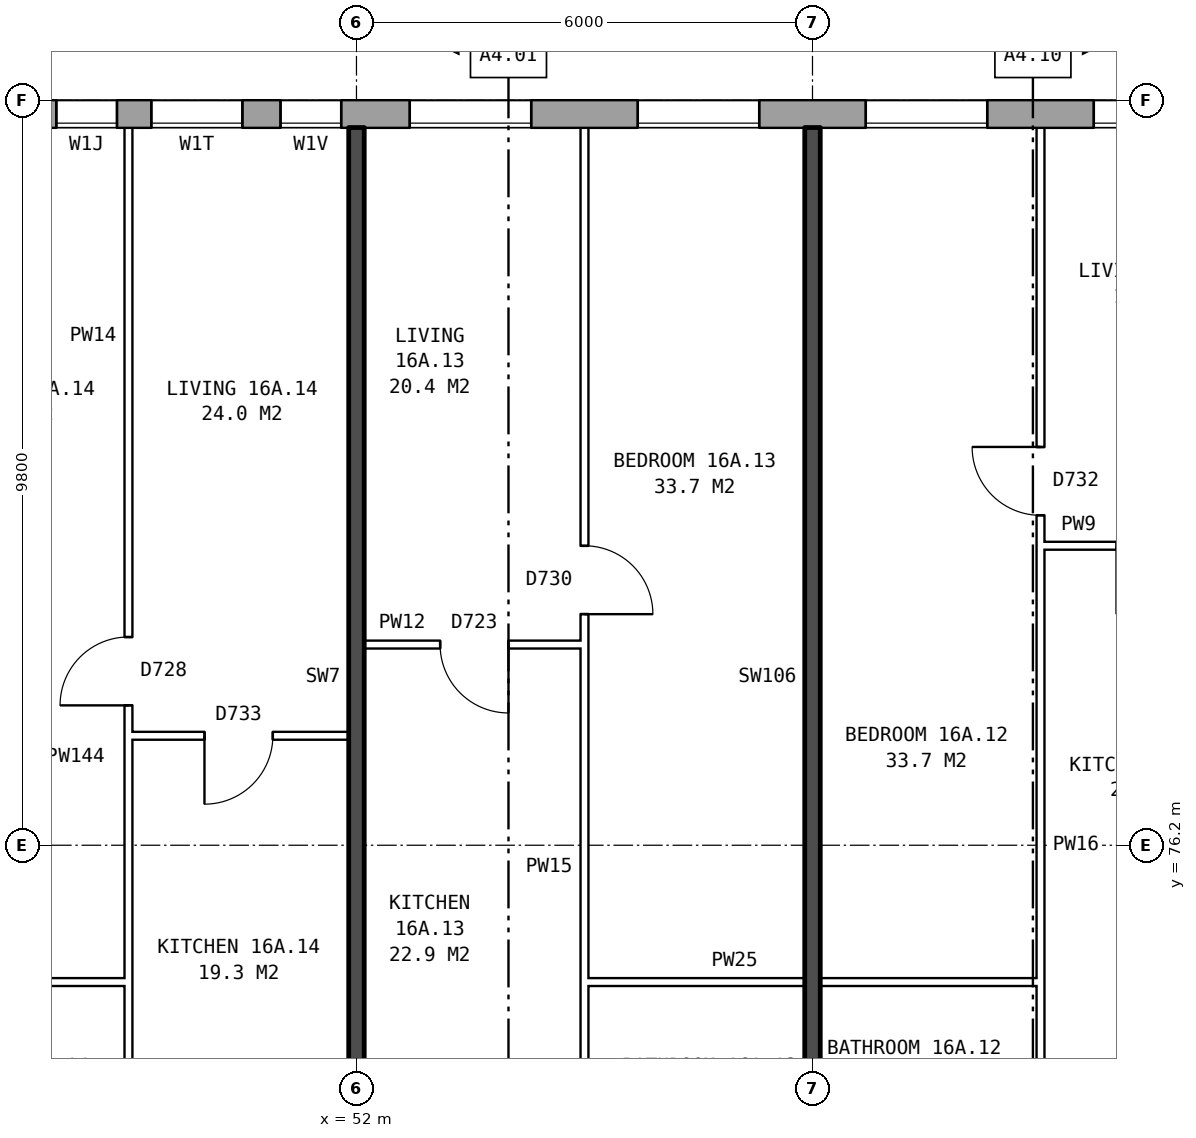
"""IFC4 building model, lengths in metres.
Left out: names, types, materials, properties, quantities, classifications, styles, units other than length and angle.
Written with IfcOpenShell. Run it as: python <this file> out.ifc"""

import sys

from ifc_helpers import new_model, si_unit, direction, frame, frame_2d, origin, place, context, subcontext, project, spatial, rectangle, extrude, element, fill, save


model = new_model("IFC4")
c1 = context("Model", 3, precision=1e-05, world=origin(), true_north=direction((0.0, 1.0)))
c2 = subcontext(c1, "Body", "Model", "MODEL_VIEW")
j1 = project(units=[si_unit("LENGTHUNIT", "METRE"), si_unit("PLANEANGLEUNIT", "RADIAN")], contexts=[c1])
p1 = place(None, origin())
s1 = spatial("IfcSite", under=j1, at=p1, CompositionType="ELEMENT")
p2 = place(p1, origin())
s2 = spatial("IfcBuilding", under=s1, at=p2, CompositionType="ELEMENT")
p3 = place(p2, frame((0.0, 0.0, 59.8)))
s3 = spatial("IfcBuildingStorey", under=s2, at=p3, CompositionType="ELEMENT", Elevation=59.8)
p4 = place(p3, frame((72.925, 85.82, 0.0), z_axis=(0.0, 0.0, 1.0), x_axis=(-1.0, 0.0, 0.0)))
e1 = element("IfcWall", 1, at=p4, inside=s3, PredefinedType="STANDARD", context=c2, shape_type="SweptSolid", body=[
    extrude(rectangle(XDim=48.351, YDim=0.36, at=frame_2d((24.175, 0.0))), origin(), (0.0, 0.0, 1.0), 2.85),
])
p5 = place(p4, frame((0.625, 0.0, 0.8)))
e2 = element("IfcOpeningElement", 2, at=p5, cuts=e1, PredefinedType="OPENING", context=c2, shape_type="SweptSolid", body=[
    extrude(rectangle(XDim=1.6, YDim=1.8, at=frame_2d((0.8, 0.9))), frame((0.0, 0.19, 0.0), z_axis=(0.0, -1.0, 0.0), x_axis=(1.0, 0.0, 0.0)), (0.0, 0.0, 1.0), 0.38),
])
p6 = place(p4, frame((3.625, 0.0, 0.8)))
e3 = element("IfcOpeningElement", 3, at=p6, cuts=e1, PredefinedType="OPENING", context=c2, shape_type="SweptSolid", body=[
    extrude(rectangle(XDim=1.6, YDim=1.8, at=frame_2d((0.8, 0.9))), frame((0.0, 0.19, 0.0), z_axis=(0.0, -1.0, 0.0), x_axis=(1.0, 0.0, 0.0)), (0.0, 0.0, 1.0), 0.38),
])
p7 = place(p4, frame((6.625, 0.0, 0.8)))
e4 = element("IfcOpeningElement", 4, at=p7, cuts=e1, PredefinedType="OPENING", context=c2, shape_type="SweptSolid", body=[
    extrude(rectangle(XDim=1.6, YDim=1.8, at=frame_2d((0.8, 0.9))), frame((0.0, 0.19, 0.0), z_axis=(0.0, -1.0, 0.0), x_axis=(1.0, 0.0, 0.0)), (0.0, 0.0, 1.0), 0.38),
])
p8 = place(p4, frame((9.625, 0.0, 0.8)))
e5 = element("IfcOpeningElement", 5, at=p8, cuts=e1, PredefinedType="OPENING", context=c2, shape_type="SweptSolid", body=[
    extrude(rectangle(XDim=1.6, YDim=1.8, at=frame_2d((0.8, 0.9))), frame((0.0, 0.19, 0.0), z_axis=(0.0, -1.0, 0.0), x_axis=(1.0, 0.0, 0.0)), (0.0, 0.0, 1.0), 0.38),
])
p9 = place(p4, frame((12.625, 0.0, 0.8)))
e6 = element("IfcOpeningElement", 6, at=p9, cuts=e1, PredefinedType="OPENING", context=c2, shape_type="SweptSolid", body=[
    extrude(rectangle(XDim=1.6, YDim=1.8, at=frame_2d((0.8, 0.9))), frame((0.0, 0.19, 0.0), z_axis=(0.0, -1.0, 0.0), x_axis=(1.0, 0.0, 0.0)), (0.0, 0.0, 1.0), 0.38),
])
p10 = place(p4, frame((15.625, 0.0, 0.8)))
e7 = element("IfcOpeningElement", 7, at=p10, cuts=e1, PredefinedType="OPENING", context=c2, shape_type="SweptSolid", body=[
    extrude(rectangle(XDim=1.6, YDim=1.8, at=frame_2d((0.8, 0.9))), frame((0.0, 0.19, 0.0), z_axis=(0.0, -1.0, 0.0), x_axis=(1.0, 0.0, 0.0)), (0.0, 0.0, 1.0), 0.38),
])
p11 = place(p4, frame((18.625, 0.0, 0.8)))
e8 = element("IfcOpeningElement", 8, at=p11, cuts=e1, PredefinedType="OPENING", context=c2, shape_type="SweptSolid", body=[
    extrude(rectangle(XDim=1.6, YDim=1.8, at=frame_2d((0.8, 0.9))), frame((0.0, 0.19, 0.0), z_axis=(0.0, -1.0, 0.0), x_axis=(1.0, 0.0, 0.0)), (0.0, 0.0, 1.0), 0.38),
])
p12 = place(p4, frame((21.125, 0.0, 1.65)))
e9 = element("IfcOpeningElement", 9, at=p12, cuts=e1, PredefinedType="OPENING", context=c2, shape_type="SweptSolid", body=[
    extrude(rectangle(XDim=0.8, YDim=0.9, at=frame_2d((0.4, 0.45))), frame((0.0, 0.19, 0.0), z_axis=(0.0, -1.0, 0.0), x_axis=(1.0, 0.0, 0.0)), (0.0, 0.0, 1.0), 0.38),
])
p13 = place(p4, frame((24.075, 0.0, 0.25)))
e10 = element("IfcOpeningElement", 10, at=p13, cuts=e1, PredefinedType="OPENING", context=c2, shape_type="SweptSolid", body=[
    extrude(rectangle(XDim=0.8, YDim=1.5, at=frame_2d((0.4, 0.75))), frame((0.0, 0.19, 0.0), z_axis=(0.0, -1.0, 0.0), x_axis=(1.0, 0.0, 0.0)), (0.0, 0.0, 1.0), 0.38),
])
p14 = place(p4, frame((27.625, 0.0, 0.8)))
e11 = element("IfcOpeningElement", 11, at=p14, cuts=e1, PredefinedType="OPENING", context=c2, shape_type="SweptSolid", body=[
    extrude(rectangle(XDim=1.6, YDim=1.8, at=frame_2d((0.8, 0.9))), frame((0.0, 0.19, 0.0), z_axis=(0.0, -1.0, 0.0), x_axis=(1.0, 0.0, 0.0)), (0.0, 0.0, 1.0), 0.38),
])
p15 = place(p4, frame((30.625, 0.0, 0.8)))
e12 = element("IfcOpeningElement", 12, at=p15, cuts=e1, PredefinedType="OPENING", context=c2, shape_type="SweptSolid", body=[
    extrude(rectangle(XDim=1.6, YDim=1.8, at=frame_2d((0.8, 0.9))), frame((0.0, 0.19, 0.0), z_axis=(0.0, -1.0, 0.0), x_axis=(1.0, 0.0, 0.0)), (0.0, 0.0, 1.0), 0.38),
])
p16 = place(p4, frame((33.625, 0.0, 0.8)))
e13 = element("IfcOpeningElement", 13, at=p16, cuts=e1, PredefinedType="OPENING", context=c2, shape_type="SweptSolid", body=[
    extrude(rectangle(XDim=1.6, YDim=1.8, at=frame_2d((0.8, 0.9))), frame((0.0, 0.19, 0.0), z_axis=(0.0, -1.0, 0.0), x_axis=(1.0, 0.0, 0.0)), (0.0, 0.0, 1.0), 0.38),
])
p17 = place(p4, frame((36.625, 0.0, 0.8)))
e14 = element("IfcOpeningElement", 14, at=p17, cuts=e1, PredefinedType="OPENING", context=c2, shape_type="SweptSolid", body=[
    extrude(rectangle(XDim=1.6, YDim=1.8, at=frame_2d((0.8, 0.9))), frame((0.0, 0.19, 0.0), z_axis=(0.0, -1.0, 0.0), x_axis=(1.0, 0.0, 0.0)), (0.0, 0.0, 1.0), 0.38),
])
p18 = place(p4, frame((39.625, 0.0, 0.8)))
e15 = element("IfcOpeningElement", 15, at=p18, cuts=e1, PredefinedType="OPENING", context=c2, shape_type="SweptSolid", body=[
    extrude(rectangle(XDim=1.6, YDim=1.8, at=frame_2d((0.8, 0.9))), frame((0.0, 0.19, 0.0), z_axis=(0.0, -1.0, 0.0), x_axis=(1.0, 0.0, 0.0)), (0.0, 0.0, 1.0), 0.38),
])
p19 = place(p4, frame((42.625, 0.0, 0.8)))
e16 = element("IfcOpeningElement", 16, at=p19, cuts=e1, PredefinedType="OPENING", context=c2, shape_type="SweptSolid", body=[
    extrude(rectangle(XDim=1.6, YDim=1.8, at=frame_2d((0.8, 0.9))), frame((0.0, 0.19, 0.0), z_axis=(0.0, -1.0, 0.0), x_axis=(1.0, 0.0, 0.0)), (0.0, 0.0, 1.0), 0.38),
])
p20 = place(p4, frame((45.625, 0.0, 0.8)))
e17 = element("IfcOpeningElement", 17, at=p20, cuts=e1, PredefinedType="OPENING", context=c2, shape_type="SweptSolid", body=[
    extrude(rectangle(XDim=1.6, YDim=1.8, at=frame_2d((0.8, 0.9))), frame((0.0, 0.19, 0.0), z_axis=(0.0, -1.0, 0.0), x_axis=(1.0, 0.0, 0.0)), (0.0, 0.0, 1.0), 0.38),
])
p21 = place(p4, frame((22.425, 0.0, 0.15)))
e18 = element("IfcOpeningElement", 18, at=p21, cuts=e1, PredefinedType="OPENING", context=c2, shape_type="SweptSolid", body=[
    extrude(rectangle(XDim=1.2, YDim=0.9, at=frame_2d((0.6, 0.45))), frame((0.0, 0.19, 0.0), z_axis=(0.0, -1.0, 0.0), x_axis=(1.0, 0.0, 0.0)), (0.0, 0.0, 1.0), 0.38),
])
p22 = place(p4, frame((25.175, 0.0, 0.25)))
e19 = element("IfcOpeningElement", 19, at=p22, cuts=e1, PredefinedType="OPENING", context=c2, shape_type="SweptSolid", body=[
    extrude(rectangle(XDim=0.6, YDim=0.9, at=frame_2d((0.3, 0.45))), frame((0.0, 0.19, 0.0), z_axis=(0.0, -1.0, 0.0), x_axis=(1.0, 0.0, 0.0)), (0.0, 0.0, 1.0), 0.38),
])
p23 = place(p3, frame((46.1, 74.4, 0.0), z_axis=(0.0, 0.0, 1.0), x_axis=(1.0, 0.0, 0.0)))
e20 = element("IfcWall", 20, at=p23, inside=s3, PredefinedType="PARTITIONING", context=c2, shape_type="SweptSolid", body=[
    extrude(rectangle(XDim=2.9, YDim=0.1, at=frame_2d((1.45, 0.0))), origin(), (0.0, 0.0, 1.0), 2.85),
])
p24 = place(p3, frame((55.0, 74.4, 0.0), z_axis=(0.0, 0.0, 1.0), x_axis=(1.0, 0.0, 0.0)))
e21 = element("IfcWall", 21, at=p24, inside=s3, PredefinedType="PARTITIONING", context=c2, shape_type="SweptSolid", body=[
    extrude(rectangle(XDim=6.0, YDim=0.1, at=frame_2d((3.0, 0.0))), origin(), (0.0, 0.0, 1.0), 2.85),
])
p25 = place(p3, frame((49.0, 77.64, 0.0), z_axis=(0.0, 0.0, 1.0), x_axis=(1.0, 0.0, 0.0)))
e22 = element("IfcWall", 22, at=p25, inside=s3, PredefinedType="PARTITIONING", context=c2, shape_type="SweptSolid", body=[
    extrude(rectangle(XDim=2.9, YDim=0.1, at=frame_2d((1.45, 0.0))), origin(), (0.0, 0.0, 1.0), 2.85),
])
p26 = place(p25, frame((1.0, 0.0, 0.0)))
e23 = element("IfcOpeningElement", 23, at=p26, cuts=e22, PredefinedType="OPENING", context=c2, shape_type="SweptSolid", body=[
    extrude(rectangle(XDim=0.9, YDim=2.1, at=frame_2d((0.45, 1.05))), frame((0.0, 0.06, 0.0), z_axis=(0.0, -1.0, 0.0), x_axis=(1.0, 0.0, 0.0)), (0.0, 0.0, 1.0), 0.12),
])
p27 = place(p3, frame((52.1, 78.84, 0.0), z_axis=(0.0, 0.0, 1.0), x_axis=(1.0, 0.0, 0.0)))
e24 = element("IfcWall", 24, at=p27, inside=s3, PredefinedType="PARTITIONING", context=c2, shape_type="SweptSolid", body=[
    extrude(rectangle(XDim=2.9, YDim=0.1, at=frame_2d((1.45, 0.0))), origin(), (0.0, 0.0, 1.0), 2.85),
])
p28 = place(p27, frame((1.0, 0.0, 0.0)))
e25 = element("IfcOpeningElement", 25, at=p28, cuts=e24, PredefinedType="OPENING", context=c2, shape_type="SweptSolid", body=[
    extrude(rectangle(XDim=0.9, YDim=2.1, at=frame_2d((0.45, 1.05))), frame((0.0, 0.06, 0.0), z_axis=(0.0, -1.0, 0.0), x_axis=(1.0, 0.0, 0.0)), (0.0, 0.0, 1.0), 0.12),
])
p29 = place(p3, frame((61.0, 80.14, 0.0), z_axis=(0.0, 0.0, 1.0), x_axis=(1.0, 0.0, 0.0)))
e26 = element("IfcWall", 26, at=p29, inside=s3, PredefinedType="PARTITIONING", context=c2, shape_type="SweptSolid", body=[
    extrude(rectangle(XDim=2.9, YDim=0.1, at=frame_2d((1.45, 0.0))), origin(), (0.0, 0.0, 1.0), 2.85),
])
p30 = place(p29, frame((1.0, 0.0, 0.0)))
e27 = element("IfcOpeningElement", 27, at=p30, cuts=e26, PredefinedType="OPENING", context=c2, shape_type="SweptSolid", body=[
    extrude(rectangle(XDim=0.9, YDim=2.1, at=frame_2d((0.45, 1.05))), frame((0.0, 0.06, 0.0), z_axis=(0.0, -1.0, 0.0), x_axis=(1.0, 0.0, 0.0)), (0.0, 0.0, 1.0), 0.12),
])
p31 = place(p3, frame((49.0, 71.3, 0.0), z_axis=(0.0, 0.0, 1.0), x_axis=(0.0, 1.0, 0.0)))
e28 = element("IfcWall", 28, at=p31, inside=s3, PredefinedType="PARTITIONING", context=c2, shape_type="SweptSolid", body=[
    extrude(rectangle(XDim=14.34, YDim=0.1, at=frame_2d((7.17, 0.0))), origin(), (0.0, 0.0, 1.0), 2.85),
])
p32 = place(p31, frame((6.74, 0.0, 0.0)))
e29 = element("IfcOpeningElement", 29, at=p32, cuts=e28, PredefinedType="OPENING", context=c2, shape_type="SweptSolid", body=[
    extrude(rectangle(XDim=0.9, YDim=2.1, at=frame_2d((0.45, 1.05))), frame((0.0, 0.06, 0.0), z_axis=(0.0, -1.0, 0.0), x_axis=(1.0, 0.0, 0.0)), (0.0, 0.0, 1.0), 0.12),
])
p33 = place(p31, frame((0.4, 0.0, 0.0)))
e30 = element("IfcOpeningElement", 30, at=p33, cuts=e28, PredefinedType="OPENING", context=c2, shape_type="SweptSolid", body=[
    extrude(rectangle(XDim=0.9, YDim=2.1, at=frame_2d((0.45, 1.05))), frame((0.0, 0.06, 0.0), z_axis=(0.0, -1.0, 0.0), x_axis=(1.0, 0.0, 0.0)), (0.0, 0.0, 1.0), 0.12),
])
p34 = place(p3, frame((52.0, 71.2, 0.0), z_axis=(0.0, 0.0, 1.0), x_axis=(0.0, 1.0, 0.0)))
e31 = element("IfcWall", 31, at=p34, inside=s3, PredefinedType="SOLIDWALL", context=c2, shape_type="SweptSolid", body=[
    extrude(rectangle(XDim=14.44, YDim=0.2, at=frame_2d((7.22, 0.0))), origin(), (0.0, 0.0, 1.0), 2.85),
])
p35 = place(p3, frame((55.0, 71.3, 0.0), z_axis=(0.0, 0.0, 1.0), x_axis=(0.0, 1.0, 0.0)))
e32 = element("IfcWall", 32, at=p35, inside=s3, PredefinedType="PARTITIONING", context=c2, shape_type="SweptSolid", body=[
    extrude(rectangle(XDim=14.34, YDim=0.1, at=frame_2d((7.17, 0.0))), origin(), (0.0, 0.0, 1.0), 2.85),
])
p36 = place(p35, frame((7.94, 0.0, 0.0)))
e33 = element("IfcOpeningElement", 33, at=p36, cuts=e32, PredefinedType="OPENING", context=c2, shape_type="SweptSolid", body=[
    extrude(rectangle(XDim=0.9, YDim=2.1, at=frame_2d((0.45, 1.05))), frame((0.0, 0.06, 0.0), z_axis=(0.0, -1.0, 0.0), x_axis=(1.0, 0.0, 0.0)), (0.0, 0.0, 1.0), 0.12),
])
p37 = place(p35, frame((0.4, 0.0, 0.0)))
e34 = element("IfcOpeningElement", 34, at=p37, cuts=e32, PredefinedType="OPENING", context=c2, shape_type="SweptSolid", body=[
    extrude(rectangle(XDim=0.9, YDim=2.1, at=frame_2d((0.45, 1.05))), frame((0.0, 0.06, 0.0), z_axis=(0.0, -1.0, 0.0), x_axis=(1.0, 0.0, 0.0)), (0.0, 0.0, 1.0), 0.12),
])
p38 = place(p3, frame((58.0, 71.2, 0.0), z_axis=(0.0, 0.0, 1.0), x_axis=(0.0, 1.0, 0.0)))
e35 = element("IfcWall", 35, at=p38, inside=s3, PredefinedType="SOLIDWALL", context=c2, shape_type="SweptSolid", body=[
    extrude(rectangle(XDim=14.44, YDim=0.2, at=frame_2d((7.22, 0.0))), origin(), (0.0, 0.0, 1.0), 2.85),
])
p39 = place(p3, frame((61.0, 71.3, 0.0), z_axis=(0.0, 0.0, 1.0), x_axis=(0.0, 1.0, 0.0)))
e36 = element("IfcWall", 36, at=p39, inside=s3, PredefinedType="PARTITIONING", context=c2, shape_type="SweptSolid", body=[
    extrude(rectangle(XDim=14.34, YDim=0.1, at=frame_2d((7.17, 0.0))), origin(), (0.0, 0.0, 1.0), 2.85),
])
p40 = place(p39, frame((9.24, 0.0, 0.0)))
e37 = element("IfcOpeningElement", 37, at=p40, cuts=e36, PredefinedType="OPENING", context=c2, shape_type="SweptSolid", body=[
    extrude(rectangle(XDim=0.9, YDim=2.1, at=frame_2d((0.45, 1.05))), frame((0.0, 0.06, 0.0), z_axis=(0.0, -1.0, 0.0), x_axis=(1.0, 0.0, 0.0)), (0.0, 0.0, 1.0), 0.12),
])
p41 = place(p39, frame((0.9, 0.0, 0.0)))
e38 = element("IfcOpeningElement", 38, at=p41, cuts=e36, PredefinedType="OPENING", context=c2, shape_type="SweptSolid", body=[
    extrude(rectangle(XDim=0.9, YDim=2.1, at=frame_2d((0.45, 1.05))), frame((0.0, 0.06, 0.0), z_axis=(0.0, -1.0, 0.0), x_axis=(1.0, 0.0, 0.0)), (0.0, 0.0, 1.0), 0.12),
])
p42 = place(p8, origin())
e39 = element("IfcWindow", 39, at=p42, inside=s3, PartitioningType="SINGLE_PANEL", PredefinedType="WINDOW", context=c2, shape_type="SweptSolid", body=[
    extrude(rectangle(XDim=1.6, YDim=1.8, at=frame_2d((0.8, 0.9))), frame((0.0, 0.15, 0.0), z_axis=(0.0, -1.0, 0.0), x_axis=(1.0, 0.0, 0.0)), (0.0, 0.0, 1.0), 0.06),
])
fill(e5, e39)
p43 = place(p9, origin())
e40 = element("IfcWindow", 40, at=p43, inside=s3, PartitioningType="SINGLE_PANEL", PredefinedType="WINDOW", context=c2, shape_type="SweptSolid", body=[
    extrude(rectangle(XDim=1.6, YDim=1.8, at=frame_2d((0.8, 0.9))), frame((0.0, 0.15, 0.0), z_axis=(0.0, -1.0, 0.0), x_axis=(1.0, 0.0, 0.0)), (0.0, 0.0, 1.0), 0.06),
])
fill(e6, e40)
p44 = place(p10, origin())
e41 = element("IfcWindow", 41, at=p44, inside=s3, PartitioningType="SINGLE_PANEL", PredefinedType="WINDOW", context=c2, shape_type="SweptSolid", body=[
    extrude(rectangle(XDim=1.6, YDim=1.8, at=frame_2d((0.8, 0.9))), frame((0.0, 0.15, 0.0), z_axis=(0.0, -1.0, 0.0), x_axis=(1.0, 0.0, 0.0)), (0.0, 0.0, 1.0), 0.06),
])
fill(e7, e41)
p45 = place(p11, origin())
e42 = element("IfcWindow", 42, at=p45, inside=s3, PartitioningType="SINGLE_PANEL", PredefinedType="WINDOW", context=c2, shape_type="SweptSolid", body=[
    extrude(rectangle(XDim=1.6, YDim=1.8, at=frame_2d((0.8, 0.9))), frame((0.0, 0.15, 0.0), z_axis=(0.0, -1.0, 0.0), x_axis=(1.0, 0.0, 0.0)), (0.0, 0.0, 1.0), 0.06),
])
fill(e8, e42)
p46 = place(p12, origin())
e43 = element("IfcWindow", 43, at=p46, inside=s3, PartitioningType="SINGLE_PANEL", PredefinedType="WINDOW", context=c2, shape_type="SweptSolid", body=[
    extrude(rectangle(XDim=0.8, YDim=0.9, at=frame_2d((0.4, 0.45))), frame((0.0, 0.15, 0.0), z_axis=(0.0, -1.0, 0.0), x_axis=(1.0, 0.0, 0.0)), (0.0, 0.0, 1.0), 0.06),
])
fill(e9, e43)
p47 = place(p13, origin())
e44 = element("IfcWindow", 44, at=p47, inside=s3, PartitioningType="SINGLE_PANEL", PredefinedType="WINDOW", context=c2, shape_type="SweptSolid", body=[
    extrude(rectangle(XDim=0.8, YDim=1.5, at=frame_2d((0.4, 0.75))), frame((0.0, 0.15, 0.0), z_axis=(0.0, -1.0, 0.0), x_axis=(1.0, 0.0, 0.0)), (0.0, 0.0, 1.0), 0.06),
])
fill(e10, e44)
p48 = place(p40, origin())
e45 = element("IfcDoor", 45, at=p48, inside=s3, OperationType="SINGLE_SWING_RIGHT", PredefinedType="DOOR", context=c2, shape_type="SweptSolid", body=[
    extrude(rectangle(XDim=0.9, YDim=2.1, at=frame_2d((0.45, 1.05))), frame((0.0, 0.025, 0.0), z_axis=(0.0, -1.0, 0.0), x_axis=(1.0, 0.0, 0.0)), (0.0, 0.0, 1.0), 0.05),
])
fill(e37, e45)
p49 = place(p36, frame((0.9, 0.0, 0.0), z_axis=(0.0, 0.0, 1.0), x_axis=(-1.0, 0.0, 0.0)))
e46 = element("IfcDoor", 46, at=p49, inside=s3, OperationType="SINGLE_SWING_RIGHT", PredefinedType="DOOR", context=c2, shape_type="SweptSolid", body=[
    extrude(rectangle(XDim=0.9, YDim=2.1, at=frame_2d((0.45, 1.05))), frame((0.0, 0.025, 0.0), z_axis=(0.0, -1.0, 0.0), x_axis=(1.0, 0.0, 0.0)), (0.0, 0.0, 1.0), 0.05),
])
fill(e33, e46)
p50 = place(p28, frame((0.9, 0.0, 0.0), z_axis=(0.0, 0.0, 1.0), x_axis=(-1.0, 0.0, 0.0)))
e47 = element("IfcDoor", 47, at=p50, inside=s3, OperationType="SINGLE_SWING_LEFT", PredefinedType="DOOR", context=c2, shape_type="SweptSolid", body=[
    extrude(rectangle(XDim=0.9, YDim=2.1, at=frame_2d((0.45, 1.05))), frame((0.0, 0.025, 0.0), z_axis=(0.0, -1.0, 0.0), x_axis=(1.0, 0.0, 0.0)), (0.0, 0.0, 1.0), 0.05),
])
fill(e25, e47)
p51 = place(p32, origin())
e48 = element("IfcDoor", 48, at=p51, inside=s3, OperationType="SINGLE_SWING_LEFT", PredefinedType="DOOR", context=c2, shape_type="SweptSolid", body=[
    extrude(rectangle(XDim=0.9, YDim=2.1, at=frame_2d((0.45, 1.05))), frame((0.0, 0.025, 0.0), z_axis=(0.0, -1.0, 0.0), x_axis=(1.0, 0.0, 0.0)), (0.0, 0.0, 1.0), 0.05),
])
fill(e29, e48)
p52 = place(p26, frame((0.9, 0.0, 0.0), z_axis=(0.0, 0.0, 1.0), x_axis=(-1.0, 0.0, 0.0)))
e49 = element("IfcDoor", 49, at=p52, inside=s3, OperationType="SINGLE_SWING_RIGHT", PredefinedType="DOOR", context=c2, shape_type="SweptSolid", body=[
    extrude(rectangle(XDim=0.9, YDim=2.1, at=frame_2d((0.45, 1.05))), frame((0.0, 0.025, 0.0), z_axis=(0.0, -1.0, 0.0), x_axis=(1.0, 0.0, 0.0)), (0.0, 0.0, 1.0), 0.05),
])
fill(e23, e49)
p53 = place(p21, origin())
e50 = element("IfcWindow", 50, at=p53, inside=s3, PartitioningType="SINGLE_PANEL", PredefinedType="WINDOW", context=c2, shape_type="SweptSolid", body=[
    extrude(rectangle(XDim=1.2, YDim=0.9, at=frame_2d((0.6, 0.45))), frame((0.0, 0.15, 0.0), z_axis=(0.0, -1.0, 0.0), x_axis=(1.0, 0.0, 0.0)), (0.0, 0.0, 1.0), 0.06),
])
fill(e18, e50)
save(model, sys.argv[1])
